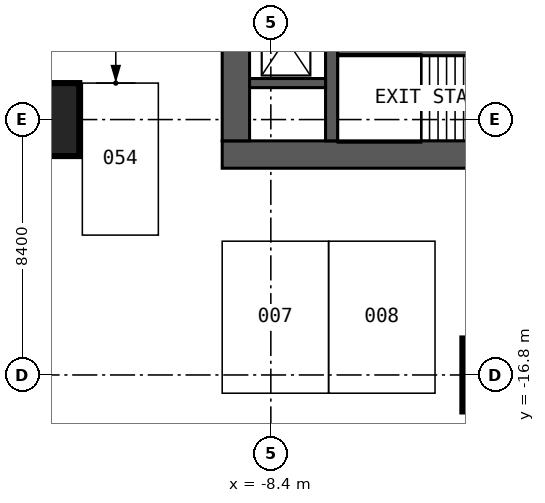
"""IFC4 building model, lengths in metres.
Left out: names, types, materials, properties, quantities, classifications, styles, units other than length and angle.
Written with IfcOpenShell. Run it as: python <this file> out.ifc"""

import sys

from ifc_helpers import new_model, si_unit, direction, frame, frame_2d, origin, origin_2d, place, context, subcontext, project, spatial, rectangle, extrude, element, save


model = new_model("IFC4")
c1 = context("Model", 3, precision=1e-05, world=origin(), true_north=direction((0.0, 1.0)))
c2 = subcontext(c1, "Body", "Model", "MODEL_VIEW")
j1 = project(units=[si_unit("LENGTHUNIT", "METRE"), si_unit("PLANEANGLEUNIT", "RADIAN")], contexts=[c1])
p1 = place(None, origin())
s1 = spatial("IfcSite", under=j1, at=p1, CompositionType="ELEMENT")
p2 = place(p1, origin())
s2 = spatial("IfcBuilding", under=s1, at=p2, CompositionType="ELEMENT")
p3 = place(p2, frame((0.0, 0.0, -13.5)))
s3 = spatial("IfcBuildingStorey", under=s2, at=p3, CompositionType="ELEMENT", Elevation=-13.5)
for number, where, z_axis, x_axis in (
    (1, (-15.9, -8.4, 0.0), (0.0, 0.0, 1.0), (1.0, 0.0, 0.0)),
    (2, (-0.9, -16.8, 0.0), (0.0, 0.0, 1.0), (1.0, 0.0, 0.0)),
):
    element("IfcColumn", number, at=place(p3, frame(where, z_axis=z_axis, x_axis=x_axis)), inside=s3, PredefinedType="COLUMN", context=c2, shape_type="SweptSolid", body=[
        extrude(rectangle(XDim=2.4, YDim=2.4, at=origin_2d()), origin(), (0.0, 0.0, 1.0), 4.5),
    ])
p4 = place(p3, frame((10.0, -9.55, 0.0), z_axis=(0.0, 0.0, 1.0), x_axis=(-1.0, 0.0, 0.0)))
e3 = element("IfcWall", 3, at=p4, inside=s3, PredefinedType="SOLIDWALL", context=c2, shape_type="SweptSolid", body=[
    extrude(rectangle(XDim=20.0, YDim=0.9, at=frame_2d((10.0, 0.0))), origin(), (0.0, 0.0, 1.0), 4.5),
])
p5 = place(p4, frame((6.875, 0.0, 0.0)))
e4 = element("IfcOpeningElement", 4, at=p5, cuts=e3, PredefinedType="OPENING", context=c2, shape_type="SweptSolid", body=[
    extrude(rectangle(XDim=1.2, YDim=2.2, at=frame_2d((0.6, 1.1))), frame((0.0, 0.46, 0.0), z_axis=(0.0, -1.0, 0.0), x_axis=(1.0, 0.0, 0.0)), (0.0, 0.0, 1.0), 0.92),
])
p6 = place(p3, frame((-9.55, 9.1, 0.0), z_axis=(0.0, 0.0, 1.0), x_axis=(0.0, -1.0, 0.0)))
e5 = element("IfcWall", 5, at=p6, inside=s3, PredefinedType="SOLIDWALL", context=c2, shape_type="SweptSolid", body=[
    extrude(rectangle(XDim=18.2, YDim=0.9, at=frame_2d((9.1, 0.0))), origin(), (0.0, 0.0, 1.0), 4.5),
])
p7 = place(p3, frame((-6.4, -9.1, 0.0), z_axis=(0.0, 0.0, 1.0), x_axis=(0.0, 1.0, 0.0)))
e6 = element("IfcWall", 6, at=p7, inside=s3, PredefinedType="SOLIDWALL", context=c2, shape_type="SweptSolid", body=[
    extrude(rectangle(XDim=18.2, YDim=0.4, at=frame_2d((9.1, 0.0))), origin(), (0.0, 0.0, 1.0), 4.5),
])
p8 = place(p7, frame((8.6, 0.0, 0.0)))
e7 = element("IfcOpeningElement", 7, at=p8, cuts=e6, PredefinedType="OPENING", context=c2, shape_type="SweptSolid", body=[
    extrude(rectangle(XDim=1.0, YDim=2.2, at=frame_2d((0.5, 1.1))), frame((0.0, 0.21, 0.0), z_axis=(0.0, -1.0, 0.0), x_axis=(1.0, 0.0, 0.0)), (0.0, 0.0, 1.0), 0.42),
])
p9 = place(p3, frame((-6.2, -6.2, 0.0), z_axis=(0.0, 0.0, 1.0), x_axis=(1.0, 0.0, 0.0)))
e8 = element("IfcWall", 8, at=p9, inside=s3, PredefinedType="SOLIDWALL", context=c2, shape_type="SweptSolid", body=[
    extrude(rectangle(XDim=7.4, YDim=0.2, at=frame_2d((3.7, 0.0))), origin(), (0.0, 0.0, 1.0), 4.5),
])
p10 = place(p3, frame((-9.1, -7.2, 0.0), z_axis=(0.0, 0.0, 1.0), x_axis=(1.0, 0.0, 0.0)))
e9 = element("IfcWall", 9, at=p10, inside=s3, PredefinedType="SOLIDWALL", context=c2, shape_type="SweptSolid", body=[
    extrude(rectangle(XDim=2.5, YDim=0.3, at=frame_2d((1.25, 0.0))), origin(), (0.0, 0.0, 1.0), 4.5),
])
save(model, sys.argv[1])
